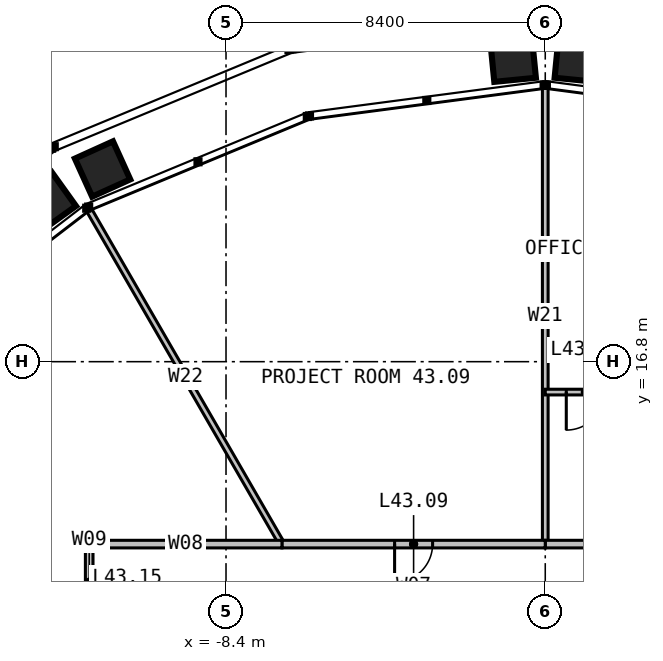
"""IFC4 building model, lengths in metres.
Left out: names, types, materials, properties, quantities, classifications, styles, units other than length and angle.
Written with IfcOpenShell. Run it as: python <this file> out.ifc"""

import sys

from ifc_helpers import new_model, si_unit, direction, frame, frame_2d, origin, place, context, subcontext, project, spatial, rectangle, extrude, element, fill, save


model = new_model("IFC4")
c1 = context("Model", 3, precision=1e-05, world=origin(), true_north=direction((0.0, 1.0)))
c2 = subcontext(c1, "Body", "Model", "MODEL_VIEW")
j1 = project(units=[si_unit("LENGTHUNIT", "METRE"), si_unit("PLANEANGLEUNIT", "RADIAN")], contexts=[c1])
p1 = place(None, origin())
s1 = spatial("IfcSite", under=j1, at=p1, CompositionType="ELEMENT")
p2 = place(p1, origin())
s2 = spatial("IfcBuilding", under=s1, at=p2, CompositionType="ELEMENT")
p3 = place(p2, frame((0.0, 0.0, 179.0)))
s3 = spatial("IfcBuildingStorey", under=s2, at=p3, CompositionType="ELEMENT", Elevation=179.0)
p4 = place(p3, frame((0.0, 12.0, 0.0), z_axis=(0.0, 0.0, 1.0), x_axis=(0.0, 1.0, 0.0)))
e1 = element("IfcWall", 1, at=p4, inside=s3, PredefinedType="PARTITIONING", context=c2, shape_type="SweptSolid", body=[
    extrude(rectangle(XDim=11.992, YDim=0.15, at=frame_2d((5.996, 0.0))), origin(), (0.0, 0.0, 1.0), 2.79),
])
p5 = place(p3, frame((-6.928, 12.0, 0.0), z_axis=(0.0, 0.0, 1.0), x_axis=(-0.49999906822, 0.866025941747, 0.0)))
e2 = element("IfcWall", 2, at=p5, inside=s3, PredefinedType="PARTITIONING", context=c2, shape_type="SweptSolid", body=[
    extrude(rectangle(XDim=10.136, YDim=0.15, at=frame_2d((5.068, 0.0))), origin(), (0.0, 0.0, 1.0), 2.79),
])
p6 = place(p3, frame((9.238, 16.0, 0.0), z_axis=(0.0, 0.0, 1.0), x_axis=(-1.0, 0.0, 0.0)))
e3 = element("IfcWall", 3, at=p6, inside=s3, PredefinedType="PARTITIONING", context=c2, shape_type="SweptSolid", body=[
    extrude(rectangle(XDim=9.238, YDim=0.15, at=frame_2d((4.619, 0.0))), origin(), (0.0, 0.0, 1.0), 2.79),
])
p7 = place(p6, frame((3.066, 0.0, 0.0)))
e4 = element("IfcOpeningElement", 4, at=p7, cuts=e3, PredefinedType="OPENING", context=c2, shape_type="SweptSolid", body=[
    extrude(rectangle(XDim=1.0, YDim=2.2, at=frame_2d((0.5, 1.1))), frame((0.0, 0.085, 0.0), z_axis=(0.0, -1.0, 0.0), x_axis=(1.0, 0.0, 0.0)), (0.0, 0.0, 1.0), 0.17),
])
p8 = place(p6, frame((7.684, 0.0, 0.0)))
e5 = element("IfcOpeningElement", 5, at=p8, cuts=e3, PredefinedType="OPENING", context=c2, shape_type="SweptSolid", body=[
    extrude(rectangle(XDim=1.0, YDim=2.2, at=frame_2d((0.5, 1.1))), frame((0.0, 0.085, 0.0), z_axis=(0.0, -1.0, 0.0), x_axis=(1.0, 0.0, 0.0)), (0.0, 0.0, 1.0), 0.17),
])
p9 = place(p3, frame((6.928, 12.0, 0.0), z_axis=(0.0, 0.0, 1.0), x_axis=(-1.0, 0.0, 0.0)))
e6 = element("IfcWall", 6, at=p9, inside=s3, PredefinedType="PARTITIONING", context=c2, shape_type="SweptSolid", body=[
    extrude(rectangle(XDim=6.928, YDim=0.2, at=frame_2d((3.464, 0.0))), origin(), (0.0, 0.0, 1.0), 3.8),
])
p10 = place(p9, frame((2.964, 0.0, 0.0)))
e7 = element("IfcOpeningElement", 7, at=p10, cuts=e6, PredefinedType="OPENING", context=c2, shape_type="SweptSolid", body=[
    extrude(rectangle(XDim=1.0, YDim=2.2, at=frame_2d((0.5, 1.1))), frame((0.0, 0.11, 0.0), z_axis=(0.0, -1.0, 0.0), x_axis=(1.0, 0.0, 0.0)), (0.0, 0.0, 1.0), 0.22),
])
p11 = place(p3, frame((0.0, 12.0, 0.0), z_axis=(0.0, 0.0, 1.0), x_axis=(-1.0, 0.0, 0.0)))
e8 = element("IfcWall", 8, at=p11, inside=s3, PredefinedType="PARTITIONING", context=c2, shape_type="SweptSolid", body=[
    extrude(rectangle(XDim=6.928, YDim=0.2, at=frame_2d((3.464, 0.0))), origin(), (0.0, 0.0, 1.0), 3.8),
])
p12 = place(p11, frame((2.964, 0.0, 0.0)))
e9 = element("IfcOpeningElement", 9, at=p12, cuts=e8, PredefinedType="OPENING", context=c2, shape_type="SweptSolid", body=[
    extrude(rectangle(XDim=1.0, YDim=2.2, at=frame_2d((0.5, 1.1))), frame((0.0, 0.11, 0.0), z_axis=(0.0, -1.0, 0.0), x_axis=(1.0, 0.0, 0.0)), (0.0, 0.0, 1.0), 0.22),
])
p13 = place(p3, frame((-6.928, 12.0, 0.0), z_axis=(0.0, 0.0, 1.0), x_axis=(-1.0, 0.0, 0.0)))
e10 = element("IfcWall", 10, at=p13, inside=s3, PredefinedType="PARTITIONING", context=c2, shape_type="SweptSolid", body=[
    extrude(rectangle(XDim=5.072, YDim=0.2, at=frame_2d((2.536, 0.0))), origin(), (0.0, 0.0, 1.0), 3.8),
])
p14 = place(p3, frame((-12.0, 12.0, 0.0), z_axis=(0.0, 0.0, 1.0), x_axis=(0.0, -1.0, 0.0)))
e11 = element("IfcWall", 11, at=p14, inside=s3, PredefinedType="PARTITIONING", context=c2, shape_type="SweptSolid", body=[
    extrude(rectangle(XDim=2.0, YDim=0.2, at=frame_2d((1.0, 0.0))), origin(), (0.0, 0.0, 1.0), 3.8),
])
p15 = place(p8, origin())
e12 = element("IfcDoor", 12, at=p15, inside=s3, OperationType="SINGLE_SWING_RIGHT", PredefinedType="DOOR", context=c2, shape_type="SweptSolid", body=[
    extrude(rectangle(XDim=1.0, YDim=2.2, at=frame_2d((0.5, 1.1))), frame((0.0, 0.025, 0.0), z_axis=(0.0, -1.0, 0.0), x_axis=(1.0, 0.0, 0.0)), (0.0, 0.0, 1.0), 0.05),
])
fill(e5, e12)
p16 = place(p12, origin())
e13 = element("IfcDoor", 13, at=p16, inside=s3, OperationType="SINGLE_SWING_RIGHT", PredefinedType="DOOR", context=c2, shape_type="SweptSolid", body=[
    extrude(rectangle(XDim=1.0, YDim=2.2, at=frame_2d((0.5, 1.1))), frame((0.0, 0.025, 0.0), z_axis=(0.0, -1.0, 0.0), x_axis=(1.0, 0.0, 0.0)), (0.0, 0.0, 1.0), 0.05),
])
fill(e9, e13)
save(model, sys.argv[1])
